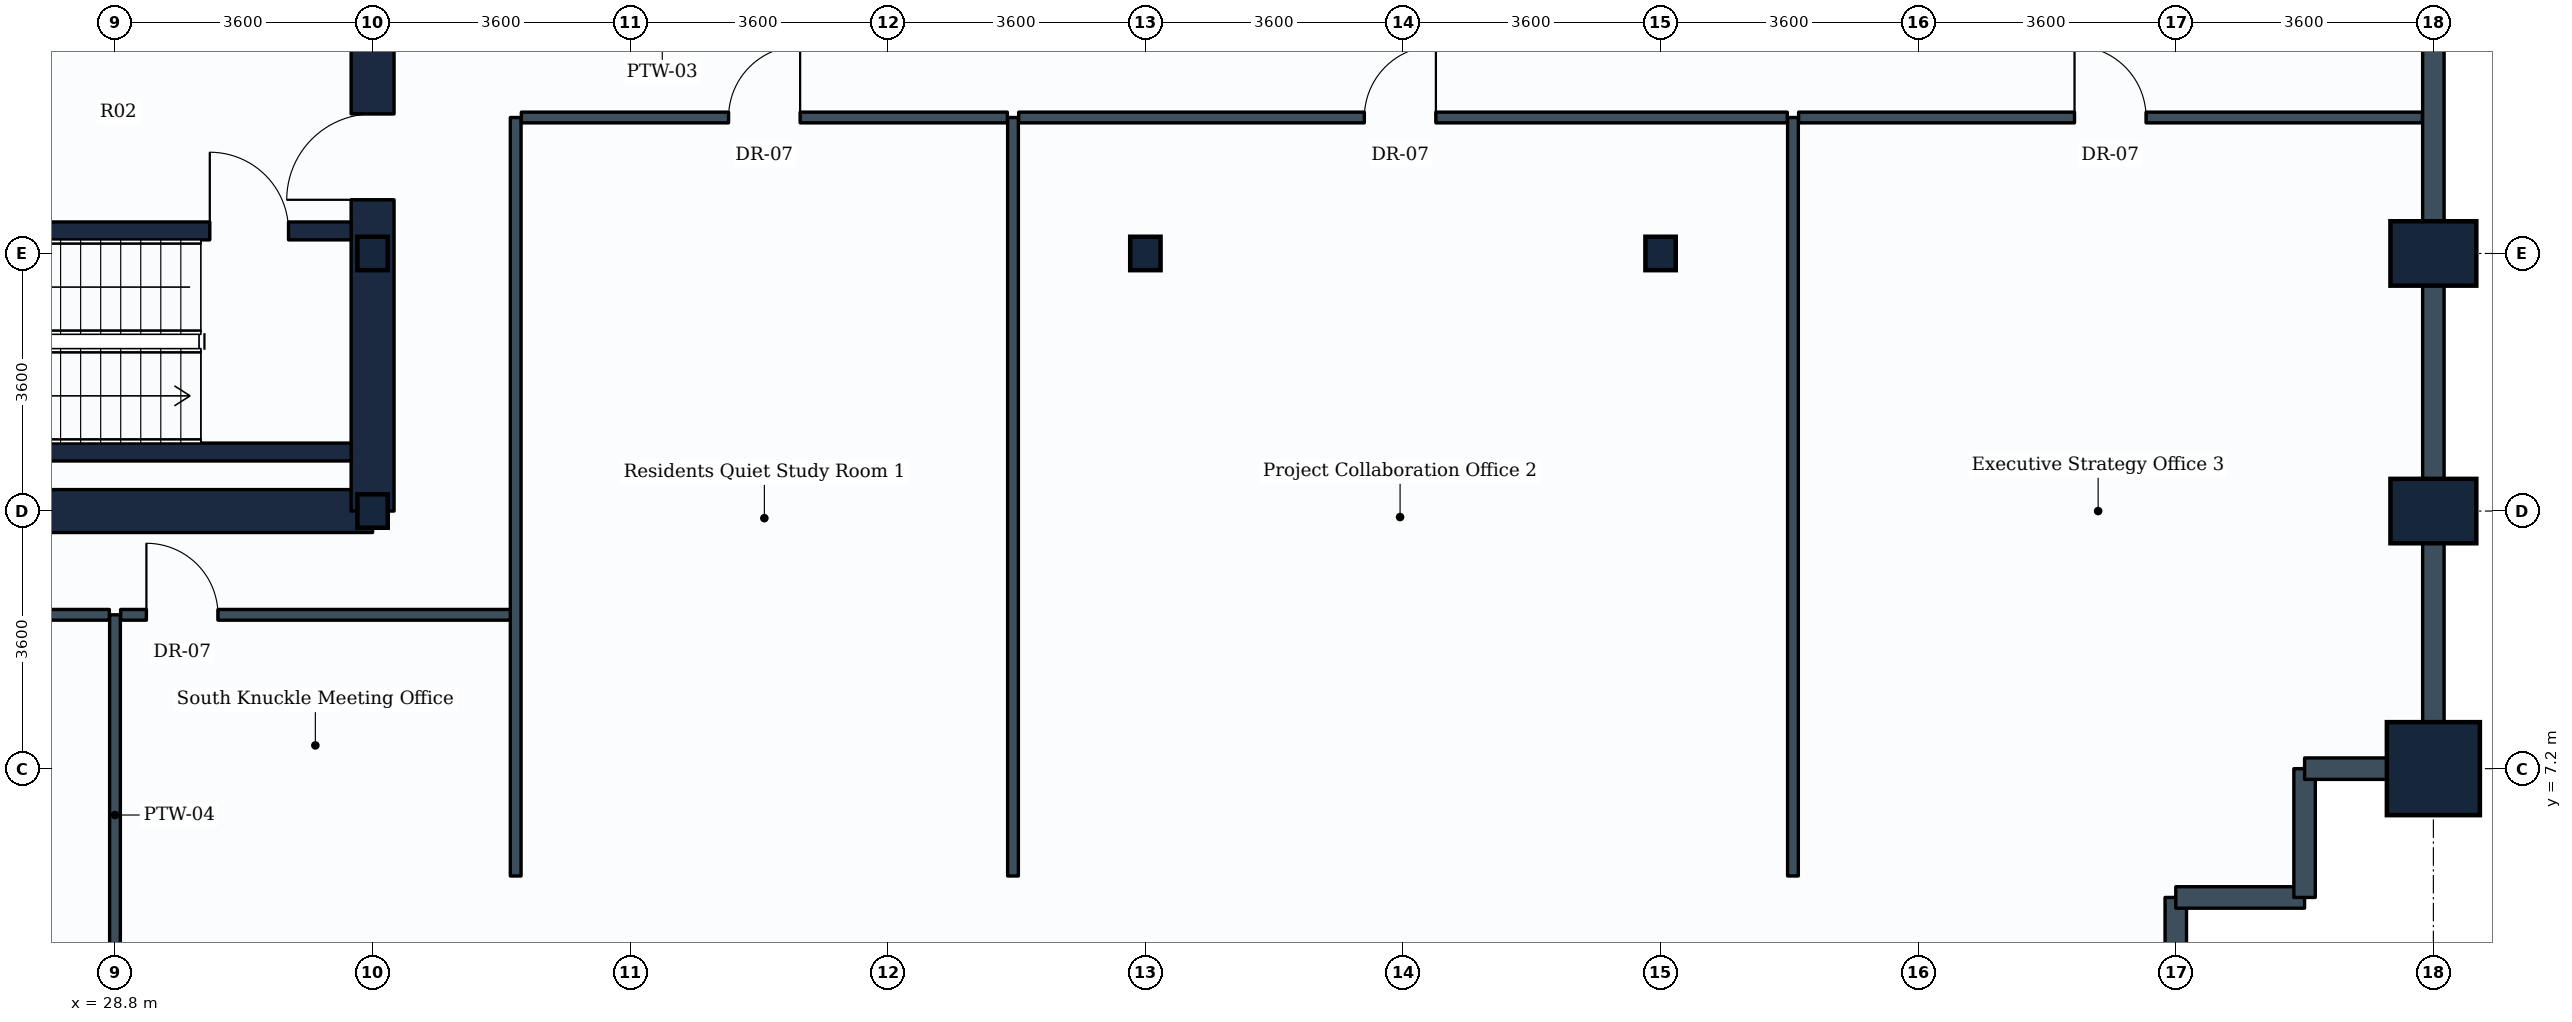
"""IFC4 building model, lengths in metres.
Left out: names, types, materials, properties, quantities, classifications, styles, units other than length and angle.
Written with IfcOpenShell. Run it as: python <this file> out.ifc"""

import sys

from ifc_helpers import new_model, si_unit, direction, frame, frame_2d, origin, origin_2d, place, context, subcontext, project, spatial, rectangle, i_section, extrude, element, fill, save


model = new_model("IFC4")
c1 = context("Model", 3, precision=1e-05, world=origin(), true_north=direction((0.0, 1.0)))
c2 = subcontext(c1, "Body", "Model", "MODEL_VIEW")
j1 = project(units=[si_unit("LENGTHUNIT", "METRE"), si_unit("PLANEANGLEUNIT", "RADIAN")], contexts=[c1])
p1 = place(None, origin())
s1 = spatial("IfcSite", under=j1, at=p1, CompositionType="ELEMENT")
p2 = place(p1, origin())
s2 = spatial("IfcBuilding", under=s1, at=p2, CompositionType="ELEMENT")
p3 = place(p2, frame((0.0, 0.0, 66.9)))
s3 = spatial("IfcBuildingStorey", under=s2, at=p3, CompositionType="ELEMENT", Elevation=66.9)
for number, where, z_axis, x_axis in (
    (1, (32.4, 10.8, 0.0), (0.0, 0.0, 1.0), (1.0, 0.0, 0.0)),
    (2, (32.4, 14.4, 0.0), (0.0, 0.0, 1.0), (1.0, 0.0, 0.0)),
    (3, (43.2, 14.4, 0.0), (0.0, 0.0, 1.0), (1.0, 0.0, 0.0)),
    (4, (50.4, 14.4, 0.0), (0.0, 0.0, 1.0), (1.0, 0.0, 0.0)),
):
    element("IfcColumn", number, at=place(p3, frame(where, z_axis=z_axis, x_axis=x_axis)), inside=s3, PredefinedType="COLUMN", context=c2, shape_type="SweptSolid", body=[
        extrude(i_section(OverallWidth=0.424, OverallDepth=0.467, WebThickness=0.033, FlangeThickness=0.053, FilletRadius=0.015, at=origin_2d()), origin(), (0.0, 0.0, 1.0), 3.9),
    ])
p4 = place(p3, frame((61.2, 7.2, 0.0), z_axis=(0.0, 0.0, 1.0), x_axis=(1.0, 0.0, 0.0)))
e5 = element("IfcColumn", 5, at=p4, inside=s3, PredefinedType="COLUMN", context=c2, shape_type="SweptSolid", body=[
    extrude(rectangle(XDim=1.3, YDim=1.3, at=origin_2d()), origin(), (0.0, 0.0, 1.0), 3.9),
])
for number, where, z_axis, x_axis in (
    (6, (61.2, 10.8, 0.0), (0.0, 0.0, 1.0), (0.0, 1.0, 0.0)),
    (7, (61.2, 14.4, 0.0), (0.0, 0.0, 1.0), (0.0, 1.0, 0.0)),
):
    element("IfcColumn", number, at=place(p3, frame(where, z_axis=z_axis, x_axis=x_axis)), inside=s3, PredefinedType="COLUMN", context=c2, shape_type="SweptSolid", body=[
        extrude(rectangle(XDim=0.9, YDim=1.2, at=origin_2d()), origin(), (0.0, 0.0, 1.0), 3.9),
    ])
p5 = place(p3, frame((57.6, 5.4, 0.0), z_axis=(0.0, 0.0, 1.0), x_axis=(0.0, -1.0, 0.0)))
e8 = element("IfcWall", 8, at=p5, inside=s3, PredefinedType="STANDARD", context=c2, shape_type="SweptSolid", body=[
    extrude(rectangle(XDim=1.8, YDim=0.3, at=frame_2d((0.9, 0.0))), origin(), (0.0, 0.0, 1.0), 2.93),
])
p6 = place(p3, frame((59.4, 5.4, 0.0), z_axis=(0.0, 0.0, 1.0), x_axis=(-1.0, 0.0, 0.0)))
e9 = element("IfcWall", 9, at=p6, inside=s3, PredefinedType="STANDARD", context=c2, shape_type="SweptSolid", body=[
    extrude(rectangle(XDim=1.8, YDim=0.3, at=frame_2d((0.9, 0.0))), origin(), (0.0, 0.0, 1.0), 3.635),
])
p7 = place(p3, frame((59.4, 7.2, 0.0), z_axis=(0.0, 0.0, 1.0), x_axis=(0.0, -1.0, 0.0)))
e10 = element("IfcWall", 10, at=p7, inside=s3, PredefinedType="STANDARD", context=c2, shape_type="SweptSolid", body=[
    extrude(rectangle(XDim=1.8, YDim=0.3, at=frame_2d((0.9, 0.0))), origin(), (0.0, 0.0, 1.0), 3.635),
])
p8 = place(p3, frame((61.2, 7.2, 0.0), z_axis=(0.0, 0.0, 1.0), x_axis=(-1.0, 0.0, 0.0)))
e11 = element("IfcWall", 11, at=p8, inside=s3, PredefinedType="STANDARD", context=c2, shape_type="SweptSolid", body=[
    extrude(rectangle(XDim=1.8, YDim=0.3, at=frame_2d((0.9, 0.0))), origin(), (0.0, 0.0, 1.0), 2.93),
])
p9 = place(p3, frame((61.2, 10.8, 0.0), z_axis=(0.0, 0.0, 1.0), x_axis=(0.0, -1.0, 0.0)))
e12 = element("IfcWall", 12, at=p9, inside=s3, PredefinedType="STANDARD", context=c2, shape_type="SweptSolid", body=[
    extrude(rectangle(XDim=3.6, YDim=0.3, at=frame_2d((1.8, 0.0))), origin(), (0.0, 0.0, 1.0), 2.93),
])
p10 = place(p3, frame((61.2, 14.4, 0.0), z_axis=(0.0, 0.0, 1.0), x_axis=(0.0, -1.0, 0.0)))
e13 = element("IfcWall", 13, at=p10, inside=s3, PredefinedType="STANDARD", context=c2, shape_type="SweptSolid", body=[
    extrude(rectangle(XDim=3.6, YDim=0.3, at=frame_2d((1.8, 0.0))), origin(), (0.0, 0.0, 1.0), 2.93),
])
p11 = place(p3, frame((61.2, 18.0, 0.0), z_axis=(0.0, 0.0, 1.0), x_axis=(0.0, -1.0, 0.0)))
e14 = element("IfcWall", 14, at=p11, inside=s3, PredefinedType="STANDARD", context=c2, shape_type="SweptSolid", body=[
    extrude(rectangle(XDim=3.6, YDim=0.3, at=frame_2d((1.8, 0.0))), origin(), (0.0, 0.0, 1.0), 2.93),
])
p12 = place(p3, frame((14.4, 10.8, 0.0), z_axis=(0.0, 0.0, 1.0), x_axis=(1.0, 0.0, 0.0)))
e15 = element("IfcWall", 15, at=p12, inside=s3, PredefinedType="SHEAR", context=c2, shape_type="SweptSolid", body=[
    extrude(rectangle(XDim=18.0, YDim=0.6, at=frame_2d((9.0, 0.0))), origin(), (0.0, 0.0, 1.0), 3.65),
])
p13 = place(p3, frame((32.4, 10.8, 0.0), z_axis=(0.0, 0.0, 1.0), x_axis=(0.0, 1.0, 0.0)))
e16 = element("IfcWall", 16, at=p13, inside=s3, PredefinedType="SHEAR", context=c2, shape_type="SweptSolid", body=[
    extrude(rectangle(XDim=14.4, YDim=0.6, at=frame_2d((7.2, 0.0))), origin(), (0.0, 0.0, 1.0), 3.65),
])
p14 = place(p13, frame((4.35, 0.0, 0.0)))
e17 = element("IfcOpeningElement", 17, at=p14, cuts=e16, PredefinedType="OPENING", context=c2, shape_type="SweptSolid", body=[
    extrude(rectangle(XDim=1.2, YDim=2.1, at=frame_2d((0.6, 1.05))), frame((0.0, 0.31, 0.0), z_axis=(0.0, -1.0, 0.0), x_axis=(1.0, 0.0, 0.0)), (0.0, 0.0, 1.0), 0.62),
])
p15 = place(p13, frame((10.0, 0.0, 0.0)))
e18 = element("IfcOpeningElement", 18, at=p15, cuts=e16, PredefinedType="OPENING", context=c2, shape_type="SweptSolid", body=[
    extrude(rectangle(XDim=1.2, YDim=2.1, at=frame_2d((0.6, 1.05))), frame((0.0, 0.31, 0.0), z_axis=(0.0, -1.0, 0.0), x_axis=(1.0, 0.0, 0.0)), (0.0, 0.0, 1.0), 0.62),
])
p16 = place(p3, frame((23.35, 11.625, 0.0), z_axis=(0.0, 0.0, 1.0), x_axis=(1.0, 0.0, 0.0)))
e19 = element("IfcWall", 19, at=p16, inside=s3, PredefinedType="SHEAR", context=c2, shape_type="SweptSolid", body=[
    extrude(rectangle(XDim=8.75, YDim=0.25, at=frame_2d((4.375, 0.0))), origin(), (0.0, 0.0, 1.0), 3.65),
])
p17 = place(p3, frame((23.35, 14.715, 0.0), z_axis=(0.0, 0.0, 1.0), x_axis=(1.0, 0.0, 0.0)))
e20 = element("IfcWall", 20, at=p17, inside=s3, PredefinedType="SHEAR", context=c2, shape_type="SweptSolid", body=[
    extrude(rectangle(XDim=8.75, YDim=0.25, at=frame_2d((4.375, 0.0))), origin(), (0.0, 0.0, 1.0), 3.65),
])
p18 = place(p17, frame((6.775, 0.0, 0.0)))
e21 = element("IfcOpeningElement", 21, at=p18, cuts=e20, PredefinedType="OPENING", context=c2, shape_type="SweptSolid", body=[
    extrude(rectangle(XDim=1.1, YDim=2.1, at=frame_2d((0.55, 1.05))), frame((0.0, 0.135, 0.0), z_axis=(0.0, -1.0, 0.0), x_axis=(1.0, 0.0, 0.0)), (0.0, 0.0, 1.0), 0.27),
])
p19 = place(p3, frame((28.8, 9.35, 0.0), z_axis=(0.0, 0.0, 1.0), x_axis=(0.0, -1.0, 0.0)))
e22 = element("IfcWall", 22, at=p19, inside=s3, PredefinedType="PARTITIONING", context=c2, shape_type="SweptSolid", body=[
    extrude(rectangle(XDim=5.596, YDim=0.15, at=frame_2d((2.798, 0.0))), origin(), (0.0, 0.0, 1.0), 3.635),
])
p20 = place(p3, frame((13.08, 9.35, 0.0), z_axis=(0.0, 0.0, 1.0), x_axis=(1.0, 0.0, 0.0)))
e23 = element("IfcWall", 23, at=p20, inside=s3, PredefinedType="PARTITIONING", context=c2, shape_type="SweptSolid", body=[
    extrude(rectangle(XDim=15.641, YDim=0.15, at=frame_2d((7.82, 0.0))), origin(), (0.0, 0.0, 1.0), 3.04),
])
p21 = place(p3, frame((28.879, 9.35, 0.0), z_axis=(0.0, 0.0, 1.0), x_axis=(1.0, 0.0, 0.0)))
e24 = element("IfcWall", 24, at=p21, inside=s3, PredefinedType="PARTITIONING", context=c2, shape_type="SweptSolid", body=[
    extrude(rectangle(XDim=5.521, YDim=0.15, at=frame_2d((2.76, 0.0))), origin(), (0.0, 0.0, 1.0), 3.635),
])
p22 = place(p21, frame((0.36, 0.0, 0.0)))
e25 = element("IfcOpeningElement", 25, at=p22, cuts=e24, PredefinedType="OPENING", context=c2, shape_type="SweptSolid", body=[
    extrude(rectangle(XDim=1.0, YDim=2.1, at=frame_2d((0.5, 1.05))), frame((0.0, 0.085, 0.0), z_axis=(0.0, -1.0, 0.0), x_axis=(1.0, 0.0, 0.0)), (0.0, 0.0, 1.0), 0.17),
])
p23 = place(p3, frame((34.4, 5.7, 0.0), z_axis=(0.0, 0.0, 1.0), x_axis=(0.0, 1.0, 0.0)))
e26 = element("IfcWall", 26, at=p23, inside=s3, PredefinedType="PARTITIONING", context=c2, shape_type="SweptSolid", body=[
    extrude(rectangle(XDim=10.6, YDim=0.15, at=frame_2d((5.3, 0.0))), origin(), (0.0, 0.0, 1.0), 3.08),
])
p24 = place(p3, frame((41.35, 5.7, 0.0), z_axis=(0.0, 0.0, 1.0), x_axis=(0.0, 1.0, 0.0)))
e27 = element("IfcWall", 27, at=p24, inside=s3, PredefinedType="PARTITIONING", context=c2, shape_type="SweptSolid", body=[
    extrude(rectangle(XDim=10.6, YDim=0.15, at=frame_2d((5.3, 0.0))), origin(), (0.0, 0.0, 1.0), 3.03),
])
p25 = place(p3, frame((34.479, 16.3, 0.0), z_axis=(0.0, 0.0, 1.0), x_axis=(1.0, 0.0, 0.0)))
e28 = element("IfcWall", 28, at=p25, inside=s3, PredefinedType="PARTITIONING", context=c2, shape_type="SweptSolid", body=[
    extrude(rectangle(XDim=6.792, YDim=0.15, at=frame_2d((3.396, 0.0))), origin(), (0.0, 0.0, 1.0), 3.04),
])
p26 = place(p25, frame((2.896, 0.0, 0.0)))
e29 = element("IfcOpeningElement", 29, at=p26, cuts=e28, PredefinedType="OPENING", context=c2, shape_type="SweptSolid", body=[
    extrude(rectangle(XDim=1.0, YDim=2.1, at=frame_2d((0.5, 1.05))), frame((0.0, 0.085, 0.0), z_axis=(0.0, -1.0, 0.0), x_axis=(1.0, 0.0, 0.0)), (0.0, 0.0, 1.0), 0.17),
])
p27 = place(p3, frame((52.25, 5.7, 0.0), z_axis=(0.0, 0.0, 1.0), x_axis=(0.0, 1.0, 0.0)))
e30 = element("IfcWall", 30, at=p27, inside=s3, PredefinedType="PARTITIONING", context=c2, shape_type="SweptSolid", body=[
    extrude(rectangle(XDim=10.6, YDim=0.15, at=frame_2d((5.3, 0.0))), origin(), (0.0, 0.0, 1.0), 3.03),
])
p28 = place(p3, frame((41.429, 16.3, 0.0), z_axis=(0.0, 0.0, 1.0), x_axis=(1.0, 0.0, 0.0)))
e31 = element("IfcWall", 31, at=p28, inside=s3, PredefinedType="PARTITIONING", context=c2, shape_type="SweptSolid", body=[
    extrude(rectangle(XDim=10.742, YDim=0.15, at=frame_2d((5.371, 0.0))), origin(), (0.0, 0.0, 1.0), 3.04),
])
p29 = place(p28, frame((4.831, 0.0, 0.0)))
e32 = element("IfcOpeningElement", 32, at=p29, cuts=e31, PredefinedType="OPENING", context=c2, shape_type="SweptSolid", body=[
    extrude(rectangle(XDim=1.0, YDim=2.1, at=frame_2d((0.5, 1.05))), frame((0.0, 0.085, 0.0), z_axis=(0.0, -1.0, 0.0), x_axis=(1.0, 0.0, 0.0)), (0.0, 0.0, 1.0), 0.17),
])
p30 = place(p3, frame((52.329, 16.3, 0.0), z_axis=(0.0, 0.0, 1.0), x_axis=(1.0, 0.0, 0.0)))
e33 = element("IfcWall", 33, at=p30, inside=s3, PredefinedType="PARTITIONING", context=c2, shape_type="SweptSolid", body=[
    extrude(rectangle(XDim=8.717, YDim=0.15, at=frame_2d((4.358, 0.0))), origin(), (0.0, 0.0, 1.0), 2.93),
])
p31 = place(p30, frame((3.856, 0.0, 0.0)))
e34 = element("IfcOpeningElement", 34, at=p31, cuts=e33, PredefinedType="OPENING", context=c2, shape_type="SweptSolid", body=[
    extrude(rectangle(XDim=1.0, YDim=2.1, at=frame_2d((0.5, 1.05))), frame((0.0, 0.085, 0.0), z_axis=(0.0, -1.0, 0.0), x_axis=(1.0, 0.0, 0.0)), (0.0, 0.0, 1.0), 0.17),
])
p32 = place(p18, origin())
e35 = element("IfcDoor", 35, at=p32, inside=s3, OperationType="SINGLE_SWING_LEFT", PredefinedType="DOOR", context=c2, shape_type="SweptSolid", body=[
    extrude(rectangle(XDim=1.1, YDim=2.1, at=frame_2d((0.55, 1.05))), frame((0.0, 0.025, 0.0), z_axis=(0.0, -1.0, 0.0), x_axis=(1.0, 0.0, 0.0)), (0.0, 0.0, 1.0), 0.05),
])
fill(e21, e35)
p33 = place(p14, origin())
e36 = element("IfcDoor", 36, at=p33, inside=s3, OperationType="SINGLE_SWING_LEFT", PredefinedType="DOOR", context=c2, shape_type="SweptSolid", body=[
    extrude(rectangle(XDim=1.2, YDim=2.1, at=frame_2d((0.6, 1.05))), frame((0.0, 0.025, 0.0), z_axis=(0.0, -1.0, 0.0), x_axis=(1.0, 0.0, 0.0)), (0.0, 0.0, 1.0), 0.05),
])
fill(e17, e36)
p34 = place(p22, origin())
e37 = element("IfcDoor", 37, at=p34, inside=s3, OperationType="SINGLE_SWING_LEFT", PredefinedType="DOOR", context=c2, shape_type="SweptSolid", body=[
    extrude(rectangle(XDim=1.0, YDim=2.1, at=frame_2d((0.5, 1.05))), frame((0.0, 0.025, 0.0), z_axis=(0.0, -1.0, 0.0), x_axis=(1.0, 0.0, 0.0)), (0.0, 0.0, 1.0), 0.05),
])
fill(e25, e37)
p35 = place(p26, origin())
e38 = element("IfcDoor", 38, at=p35, inside=s3, OperationType="SINGLE_SWING_RIGHT", PredefinedType="DOOR", context=c2, shape_type="SweptSolid", body=[
    extrude(rectangle(XDim=1.0, YDim=2.1, at=frame_2d((0.5, 1.05))), frame((0.0, 0.025, 0.0), z_axis=(0.0, -1.0, 0.0), x_axis=(1.0, 0.0, 0.0)), (0.0, 0.0, 1.0), 0.05),
])
fill(e29, e38)
p36 = place(p29, origin())
e39 = element("IfcDoor", 39, at=p36, inside=s3, OperationType="SINGLE_SWING_RIGHT", PredefinedType="DOOR", context=c2, shape_type="SweptSolid", body=[
    extrude(rectangle(XDim=1.0, YDim=2.1, at=frame_2d((0.5, 1.05))), frame((0.0, 0.025, 0.0), z_axis=(0.0, -1.0, 0.0), x_axis=(1.0, 0.0, 0.0)), (0.0, 0.0, 1.0), 0.05),
])
fill(e32, e39)
p37 = place(p31, origin())
e40 = element("IfcDoor", 40, at=p37, inside=s3, OperationType="SINGLE_SWING_LEFT", PredefinedType="DOOR", context=c2, shape_type="SweptSolid", body=[
    extrude(rectangle(XDim=1.0, YDim=2.1, at=frame_2d((0.5, 1.05))), frame((0.0, 0.025, 0.0), z_axis=(0.0, -1.0, 0.0), x_axis=(1.0, 0.0, 0.0)), (0.0, 0.0, 1.0), 0.05),
])
fill(e34, e40)
save(model, sys.argv[1])
